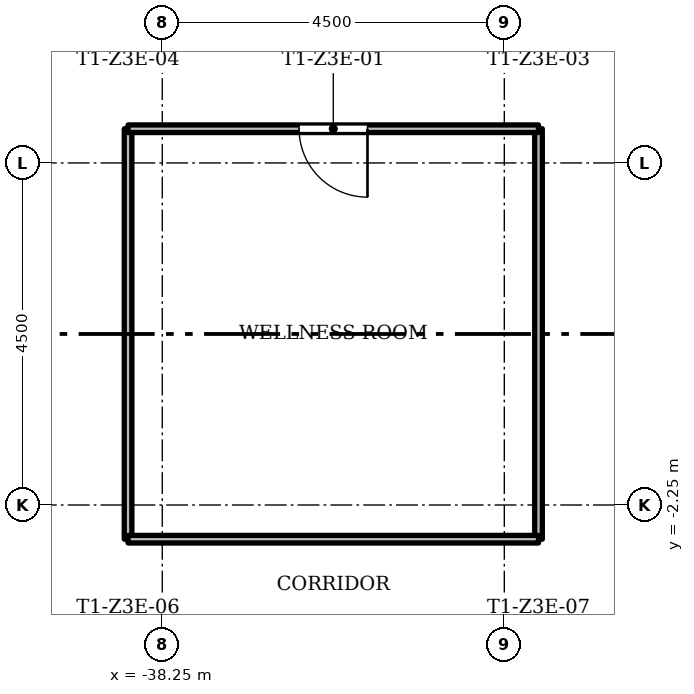
"""IFC4 building model, lengths in metres.
Left out: names, types, materials, properties, quantities, classifications, styles, units other than length and angle.
Written with IfcOpenShell. Run it as: python <this file> out.ifc"""

import sys

from ifc_helpers import new_model, si_unit, direction, frame, frame_2d, origin, place, context, subcontext, project, spatial, rectangle, extrude, element, fill, save


model = new_model("IFC4")
c1 = context("Model", 3, precision=1e-05, world=origin(), true_north=direction((0.0, 1.0)))
c2 = subcontext(c1, "Body", "Model", "MODEL_VIEW")
j1 = project(units=[si_unit("LENGTHUNIT", "METRE"), si_unit("PLANEANGLEUNIT", "RADIAN")], contexts=[c1])
p1 = place(None, origin())
s1 = spatial("IfcSite", under=j1, at=p1, CompositionType="ELEMENT")
p2 = place(p1, origin())
s2 = spatial("IfcBuilding", under=s1, at=p2, CompositionType="ELEMENT")
p3 = place(p2, frame((0.0, 0.0, 177.9)))
s3 = spatial("IfcBuildingStorey", under=s2, at=p3, CompositionType="ELEMENT", Elevation=177.9)
for number, where, z_axis, x_axis in (
    (1, (-38.7, -2.7, 0.0), (0.0, 0.0, 1.0), (0.0, 1.0, 0.0)),
    (2, (-33.3, -2.7, 0.0), (0.0, 0.0, 1.0), (0.0, 1.0, 0.0)),
    (3, (-38.7, -2.7, 0.0), (0.0, 0.0, 1.0), (1.0, 0.0, 0.0)),
):
    element("IfcWall", number, at=place(p3, frame(where, z_axis=z_axis, x_axis=x_axis)), inside=s3, PredefinedType="PARTITIONING", context=c2, shape_type="SweptSolid", body=[
        extrude(rectangle(XDim=5.4, YDim=0.1, at=frame_2d((2.7, 0.0))), origin(), (0.0, 0.0, 1.0), 3.0),
    ])
p4 = place(p3, frame((-38.7, 2.7, 0.0), z_axis=(0.0, 0.0, 1.0), x_axis=(1.0, 0.0, 0.0)))
e4 = element("IfcWall", 4, at=p4, inside=s3, PredefinedType="PARTITIONING", context=c2, shape_type="SweptSolid", body=[
    extrude(rectangle(XDim=5.4, YDim=0.1, at=frame_2d((2.7, 0.0))), origin(), (0.0, 0.0, 1.0), 3.0),
])
p5 = place(p4, frame((2.25, 0.0, 0.0)))
e5 = element("IfcOpeningElement", 5, at=p5, cuts=e4, PredefinedType="OPENING", context=c2, shape_type="SweptSolid", body=[
    extrude(rectangle(XDim=0.9, YDim=2.1, at=frame_2d((0.45, 1.05))), frame((0.0, 0.06, 0.0), z_axis=(0.0, -1.0, 0.0), x_axis=(1.0, 0.0, 0.0)), (0.0, 0.0, 1.0), 0.12),
])
p6 = place(p5, origin())
e6 = element("IfcDoor", 6, at=p6, inside=s3, OperationType="SINGLE_SWING_RIGHT", PredefinedType="DOOR", context=c2, shape_type="SweptSolid", body=[
    extrude(rectangle(XDim=0.9, YDim=2.1, at=frame_2d((0.45, 1.05))), frame((0.0, 0.025, 0.0), z_axis=(0.0, -1.0, 0.0), x_axis=(1.0, 0.0, 0.0)), (0.0, 0.0, 1.0), 0.05),
])
fill(e5, e6)
save(model, sys.argv[1])
